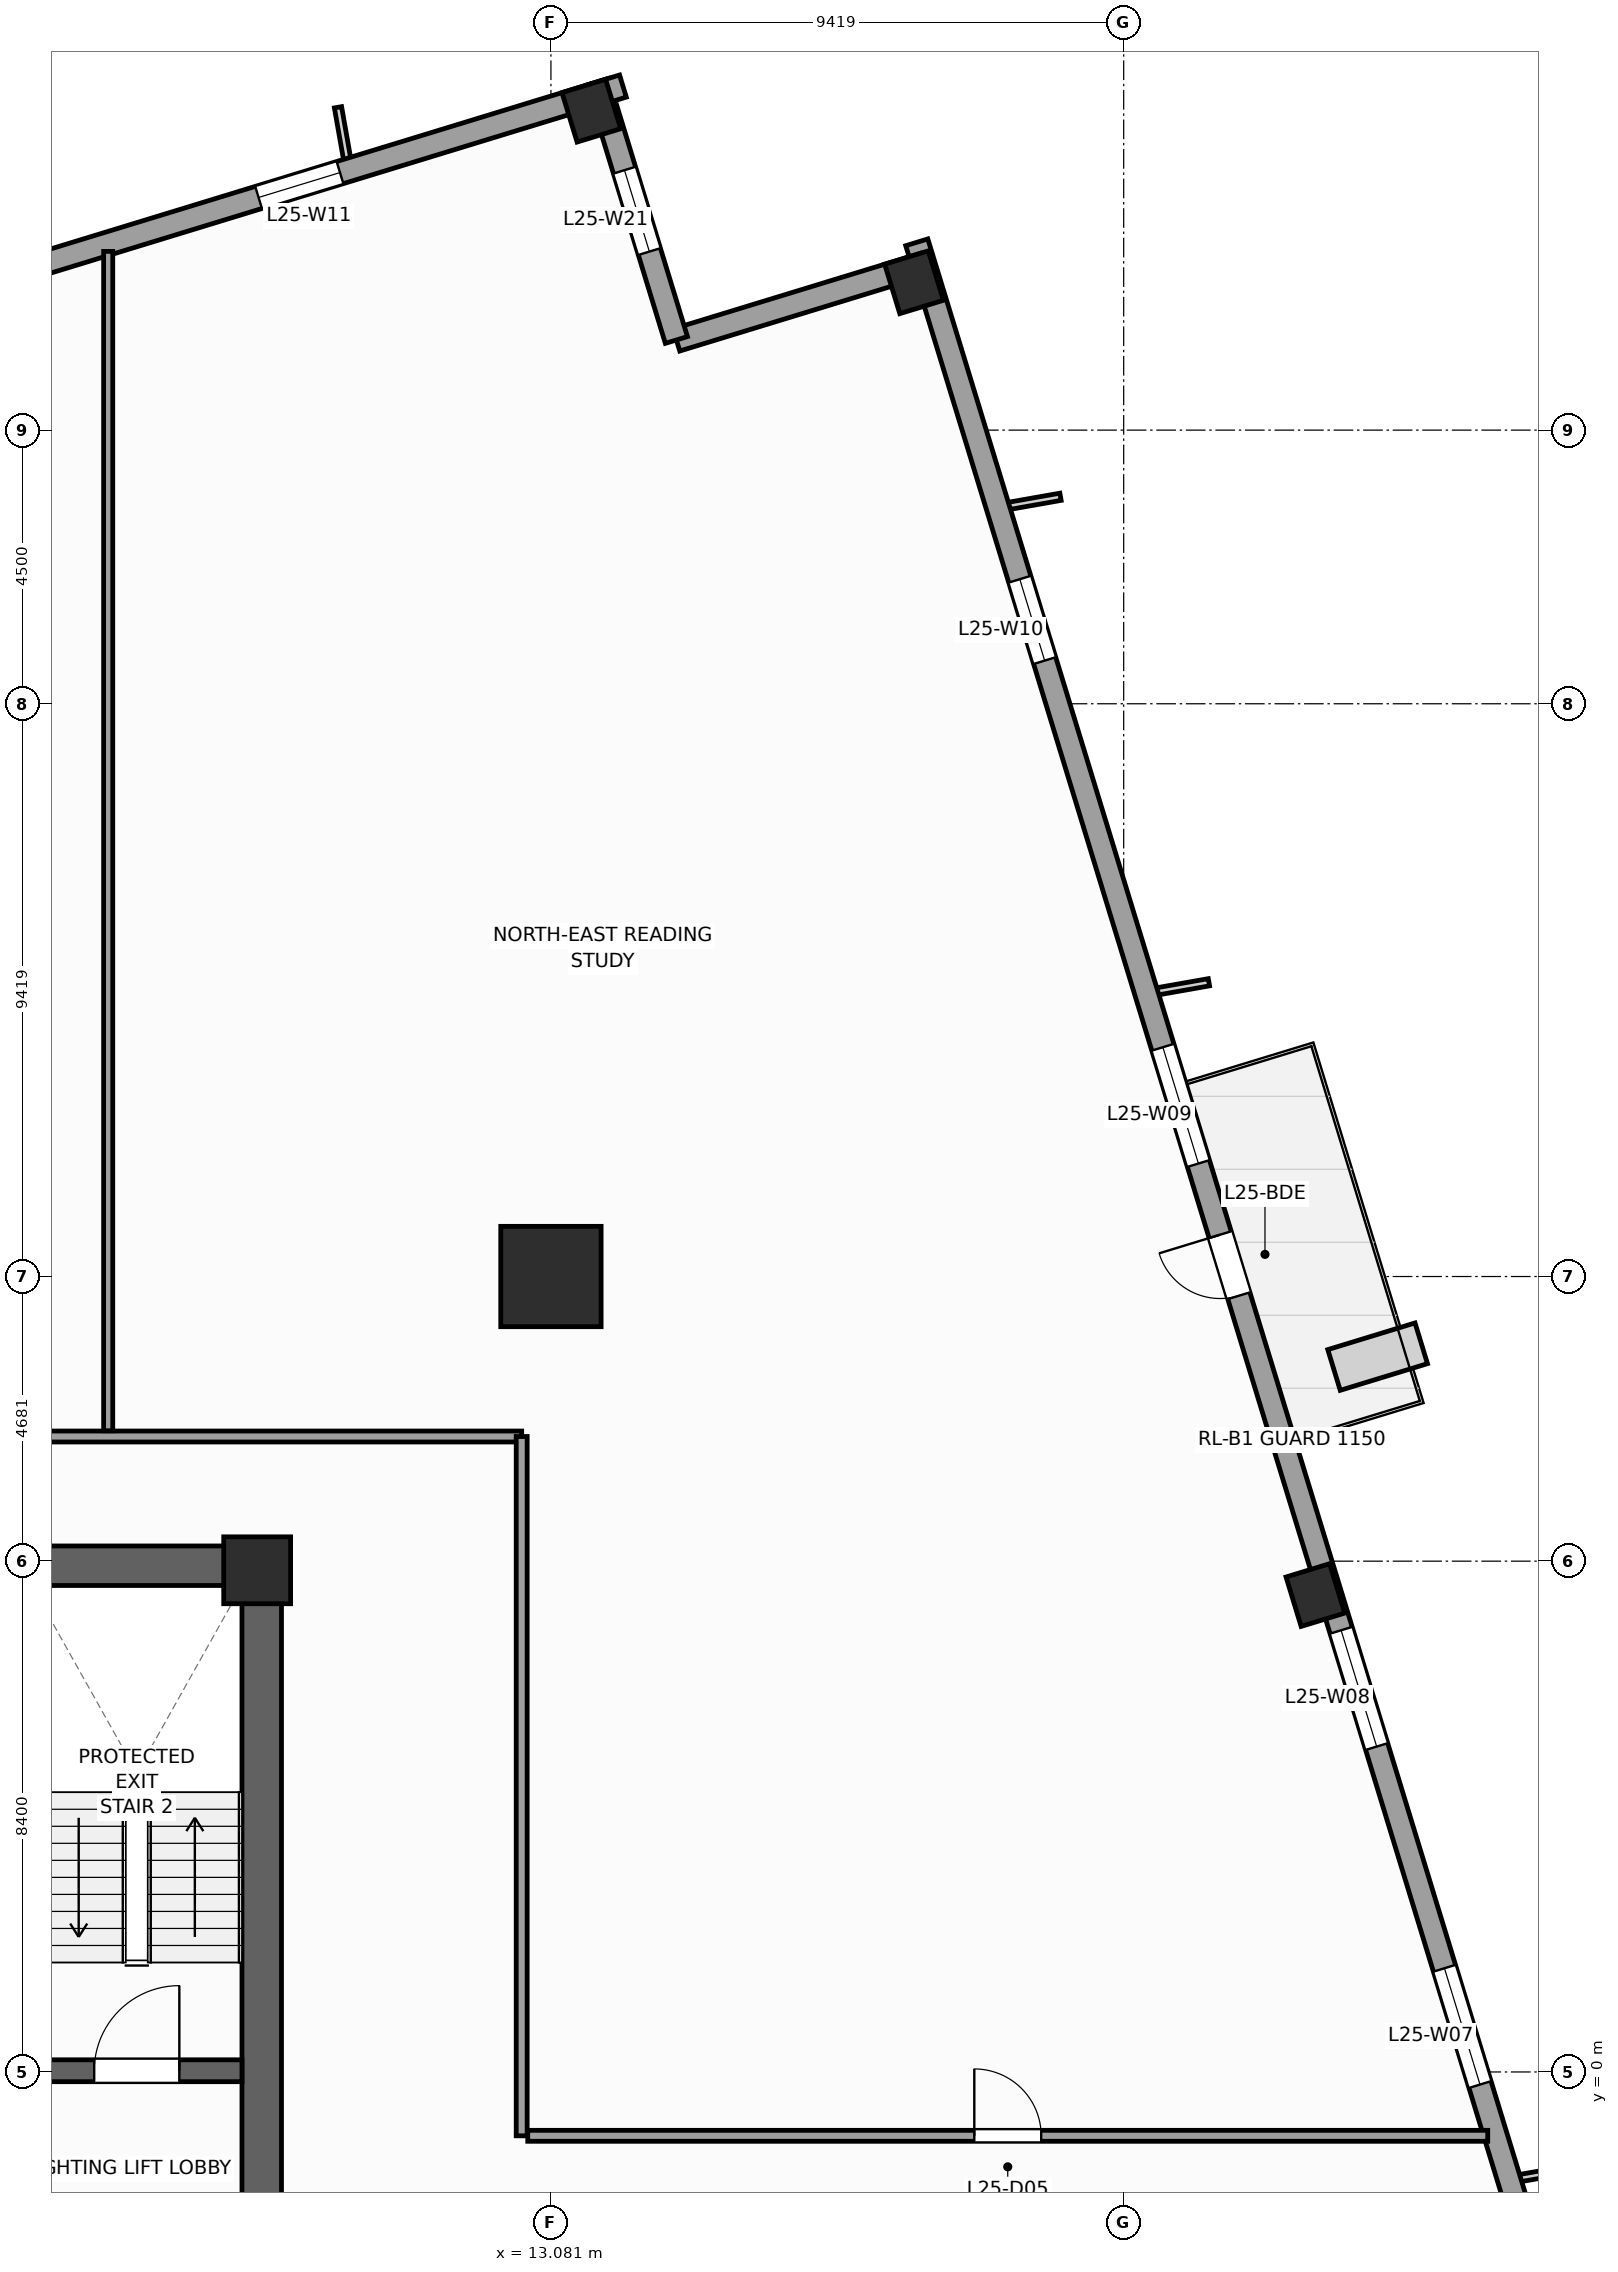
"""IFC4 building model, lengths in metres.
Left out: names, types, materials, properties, quantities, classifications, styles, units other than length and angle.
Written with IfcOpenShell. Run it as: python <this file> out.ifc"""

import sys

from ifc_helpers import new_model, si_unit, direction, frame, frame_2d, origin, origin_2d, place, context, subcontext, project, spatial, rectangle, extrude, source, transform, mapped, element, fill, save


model = new_model("IFC4")
c1 = context("Model", 3, precision=1e-05, world=origin(), true_north=direction((0.0, 1.0)))
c2 = subcontext(c1, "Body", "Model", "MODEL_VIEW")
j1 = project(units=[si_unit("LENGTHUNIT", "METRE"), si_unit("PLANEANGLEUNIT", "RADIAN")], contexts=[c1])
p1 = place(None, origin())
s1 = spatial("IfcSite", under=j1, at=p1, CompositionType="ELEMENT")
p2 = place(p1, origin())
s2 = spatial("IfcBuilding", under=s1, at=p2, CompositionType="ELEMENT")
p3 = place(p2, frame((0.0, 0.0, 107.2)))
s3 = spatial("IfcBuildingStorey", under=s2, at=p3, CompositionType="ELEMENT", Elevation=107.2)
p4 = place(p3, frame((-8.65, 8.325, 0.0), z_axis=(0.0, 0.0, 1.0), x_axis=(1.0, 0.0, 0.0)))
e1 = element("IfcWall", 1, at=p4, inside=s3, PredefinedType="SHEAR", context=c2, shape_type="SweptSolid", body=[
    extrude(rectangle(XDim=17.3, YDim=0.65, at=frame_2d((8.65, 0.0))), origin(), (0.0, 0.0, 1.0), 4.0),
])
p5 = place(p3, frame((8.325, -8.0, 0.0), z_axis=(0.0, 0.0, 1.0), x_axis=(0.0, 1.0, 0.0)))
e2 = element("IfcWall", 2, at=p5, inside=s3, PredefinedType="SHEAR", context=c2, shape_type="SweptSolid", body=[
    extrude(rectangle(XDim=16.0, YDim=0.65, at=frame_2d((8.0, 0.0))), origin(), (0.0, 0.0, 1.0), 4.0),
])
p6 = place(p5, frame((4.69, 0.0, 0.0)))
e3 = element("IfcOpeningElement", 3, at=p6, cuts=e2, PredefinedType="OPENING", context=c2, shape_type="SweptSolid", body=[
    extrude(rectangle(XDim=1.3, YDim=2.2, at=frame_2d((0.65, 1.1))), frame((0.0, 0.335, 0.0), z_axis=(0.0, -1.0, 0.0), x_axis=(1.0, 0.0, 0.0)), (0.0, 0.0, 1.0), 0.67),
])
p7 = place(p3, frame((4.54, 0.02, 0.0), z_axis=(0.0, 0.0, 1.0), x_axis=(1.0, 0.0, 0.0)))
e4 = element("IfcWall", 4, at=p7, inside=s3, PredefinedType="SHEAR", context=c2, shape_type="SweptSolid", body=[
    extrude(rectangle(XDim=3.46, YDim=0.36, at=frame_2d((1.73, 0.0))), origin(), (0.0, 0.0, 1.0), 4.0),
])
p8 = place(p7, frame((1.03, 0.0, 0.0)))
e5 = element("IfcOpeningElement", 5, at=p8, cuts=e4, PredefinedType="OPENING", context=c2, shape_type="SweptSolid", body=[
    extrude(rectangle(XDim=1.4, YDim=2.2, at=frame_2d((0.7, 1.1))), frame((0.0, 0.19, 0.0), z_axis=(0.0, -1.0, 0.0), x_axis=(1.0, 0.0, 0.0)), (0.0, 0.0, 1.0), 0.38),
])
m1 = source(origin(), c2, "Body", "SweptSolid", [
    extrude(rectangle(XDim=1.1, YDim=1.1, at=origin_2d()), origin(), (0.0, 0.0, 1.0), 4.0),
])
p9 = place(p3, frame((8.25, 8.25, 0.0), z_axis=(0.0, 0.0, 1.0), x_axis=(1.0, 0.0, 0.0)))
e6 = element("IfcColumn", 6, at=p9, inside=s3, PredefinedType="PILASTER", context=c2, shape_type="MappedRepresentation", body=[
    mapped(m1, transform((0.0, 0.0, 0.0), scale=1.0)),
])
m2 = source(origin(), c2, "Body", "SweptSolid", [
    extrude(rectangle(XDim=1.65, YDim=1.65, at=origin_2d()), origin(), (0.0, 0.0, 1.0), 4.0),
])
p10 = place(p3, frame((13.081, 13.081, 0.0), z_axis=(0.0, 0.0, 1.0), x_axis=(1.0, 0.0, 0.0)))
e7 = element("IfcColumn", 7, at=p10, inside=s3, PredefinedType="COLUMN", context=c2, shape_type="MappedRepresentation", body=[
    mapped(m2, transform((0.0, 0.0, 0.0), scale=1.0)),
])
m3 = source(origin(), c2, "Body", "SweptSolid", [
    extrude(rectangle(XDim=0.75, YDim=0.85, at=origin_2d()), origin(), (0.0, 0.0, 1.0), 4.0),
])
for number, where, z_axis, x_axis in (
    (8, (25.653, 7.843, 0.0), (0.0, 0.0, 1.0), (0.956, 0.292, 0.0)),
    (9, (19.052, 29.431, 0.0), (0.0, 0.0, 1.0), (0.956, 0.292, 0.0)),
    (10, (13.746, 32.253, 0.0), (0.0, 0.0, 1.0), (0.956, 0.292, 0.0)),
):
    element("IfcColumn", number, at=place(p3, frame(where, z_axis=z_axis, x_axis=x_axis)), inside=s3, PredefinedType="COLUMN", context=c2, shape_type="MappedRepresentation", body=[
        mapped(m3, transform((0.0, 0.0, 0.0), scale=1.0)),
    ])
p11 = place(p3, frame((32.658, -14.265, 0.0), z_axis=(0.0, 0.0, 1.0), x_axis=(-0.292373127906, 0.956304320851, 0.0)))
e11 = element("IfcWall", 11, at=p11, inside=s3, PredefinedType="STANDARD", context=c2, shape_type="SweptSolid", body=[
    extrude(rectangle(XDim=46.38, YDim=0.38, at=frame_2d((23.19, 0.0))), origin(), (0.0, 0.0, 1.0), 3.14),
])
p12 = place(p11, frame((28.265, 0.0, 0.0)))
e12 = element("IfcOpeningElement", 12, at=p12, cuts=e11, PredefinedType="OPENING", context=c2, shape_type="SweptSolid", body=[
    extrude(rectangle(XDim=1.05, YDim=2.25, at=frame_2d((0.525, 1.125))), frame((0.0, 0.2, 0.0), z_axis=(0.0, -1.0, 0.0), x_axis=(1.0, 0.0, 0.0)), (0.0, 0.0, 1.0), 0.4),
])
p13 = place(p11, frame((4.865, 0.0, 0.51)))
e13 = element("IfcOpeningElement", 13, at=p13, cuts=e11, PredefinedType="OPENING", context=c2, shape_type="SweptSolid", body=[
    extrude(rectangle(XDim=1.4, YDim=2.4, at=frame_2d((0.7, 1.2))), frame((0.0, 0.2, 0.0), z_axis=(0.0, -1.0, 0.0), x_axis=(1.0, 0.0, 0.0)), (0.0, 0.0, 1.0), 0.4),
])
p14 = place(p11, frame((14.7, 0.0, 0.51)))
e14 = element("IfcOpeningElement", 14, at=p14, cuts=e11, PredefinedType="OPENING", context=c2, shape_type="SweptSolid", body=[
    extrude(rectangle(XDim=2.0, YDim=2.4, at=frame_2d((1.0, 1.2))), frame((0.0, 0.2, 0.0), z_axis=(0.0, -1.0, 0.0), x_axis=(1.0, 0.0, 0.0)), (0.0, 0.0, 1.0), 0.4),
])
p15 = place(p11, frame((20.512, 0.0, 0.51)))
e15 = element("IfcOpeningElement", 15, at=p15, cuts=e11, PredefinedType="OPENING", context=c2, shape_type="SweptSolid", body=[
    extrude(rectangle(XDim=2.0, YDim=2.4, at=frame_2d((1.0, 1.2))), frame((0.0, 0.2, 0.0), z_axis=(0.0, -1.0, 0.0), x_axis=(1.0, 0.0, 0.0)), (0.0, 0.0, 1.0), 0.4),
])
p16 = place(p11, frame((30.538, 0.0, 0.51)))
e16 = element("IfcOpeningElement", 16, at=p16, cuts=e11, PredefinedType="OPENING", context=c2, shape_type="SweptSolid", body=[
    extrude(rectangle(XDim=2.0, YDim=2.4, at=frame_2d((1.0, 1.2))), frame((0.0, 0.2, 0.0), z_axis=(0.0, -1.0, 0.0), x_axis=(1.0, 0.0, 0.0)), (0.0, 0.0, 1.0), 0.4),
])
p17 = place(p11, frame((39.187, 0.0, 0.51)))
e17 = element("IfcOpeningElement", 17, at=p17, cuts=e11, PredefinedType="OPENING", context=c2, shape_type="SweptSolid", body=[
    extrude(rectangle(XDim=1.4, YDim=2.4, at=frame_2d((0.7, 1.2))), frame((0.0, 0.2, 0.0), z_axis=(0.0, -1.0, 0.0), x_axis=(1.0, 0.0, 0.0)), (0.0, 0.0, 1.0), 0.4),
])
p18 = place(p3, frame((19.208, 29.725, 0.0), z_axis=(0.0, 0.0, 1.0), x_axis=(-0.956312764915, -0.292345507338, 0.0)))
e18 = element("IfcWall", 18, at=p18, inside=s3, PredefinedType="STANDARD", context=c2, shape_type="SweptSolid", body=[
    extrude(rectangle(XDim=4.25, YDim=0.38, at=frame_2d((2.125, 0.0))), origin(), (0.0, 0.0, 1.0), 3.74),
])
p19 = place(p3, frame((15.144, 28.482, 0.0), z_axis=(0.0, 0.0, 1.0), x_axis=(-0.292373601522, 0.956304176051, 0.0)))
e19 = element("IfcWall", 19, at=p19, inside=s3, PredefinedType="STANDARD", context=c2, shape_type="SweptSolid", body=[
    extrude(rectangle(XDim=4.44, YDim=0.38, at=frame_2d((2.22, 0.0))), origin(), (0.0, 0.0, 1.0), 3.04),
])
p20 = place(p19, frame((1.52, 0.0, 0.51)))
e20 = element("IfcOpeningElement", 20, at=p20, cuts=e19, PredefinedType="OPENING", context=c2, shape_type="SweptSolid", body=[
    extrude(rectangle(XDim=1.4, YDim=2.4, at=frame_2d((0.7, 1.2))), frame((0.0, 0.2, 0.0), z_axis=(0.0, -1.0, 0.0), x_axis=(1.0, 0.0, 0.0)), (0.0, 0.0, 1.0), 0.4),
])
p21 = place(p3, frame((14.265, 32.658, 0.0), z_axis=(0.0, 0.0, 1.0), x_axis=(-0.956304320851, -0.292373127906, 0.0)))
e21 = element("IfcWall", 21, at=p21, inside=s3, PredefinedType="STANDARD", context=c2, shape_type="SweptSolid", body=[
    extrude(rectangle(XDim=46.38, YDim=0.38, at=frame_2d((23.19, 0.0))), origin(), (0.0, 0.0, 1.0), 3.14),
])
p22 = place(p21, frame((4.865, 0.0, 0.51)))
e22 = element("IfcOpeningElement", 22, at=p22, cuts=e21, PredefinedType="OPENING", context=c2, shape_type="SweptSolid", body=[
    extrude(rectangle(XDim=1.4, YDim=2.4, at=frame_2d((0.7, 1.2))), frame((0.0, 0.2, 0.0), z_axis=(0.0, -1.0, 0.0), x_axis=(1.0, 0.0, 0.0)), (0.0, 0.0, 1.0), 0.4),
])
p23 = place(p21, frame((12.45, 0.0, 0.51)))
e23 = element("IfcOpeningElement", 23, at=p23, cuts=e21, PredefinedType="OPENING", context=c2, shape_type="SweptSolid", body=[
    extrude(rectangle(XDim=2.0, YDim=2.4, at=frame_2d((1.0, 1.2))), frame((0.0, 0.2, 0.0), z_axis=(0.0, -1.0, 0.0), x_axis=(1.0, 0.0, 0.0)), (0.0, 0.0, 1.0), 0.4),
])
p24 = place(p21, frame((30.538, 0.0, 0.51)))
e24 = element("IfcOpeningElement", 24, at=p24, cuts=e21, PredefinedType="OPENING", context=c2, shape_type="SweptSolid", body=[
    extrude(rectangle(XDim=2.0, YDim=2.4, at=frame_2d((1.0, 1.2))), frame((0.0, 0.2, 0.0), z_axis=(0.0, -1.0, 0.0), x_axis=(1.0, 0.0, 0.0)), (0.0, 0.0, 1.0), 0.4),
])
p25 = place(p21, frame((39.187, 0.0, 0.51)))
e25 = element("IfcOpeningElement", 25, at=p25, cuts=e21, PredefinedType="OPENING", context=c2, shape_type="SweptSolid", body=[
    extrude(rectangle(XDim=1.4, YDim=2.4, at=frame_2d((0.7, 1.2))), frame((0.0, 0.2, 0.0), z_axis=(0.0, -1.0, 0.0), x_axis=(1.0, 0.0, 0.0)), (0.0, 0.0, 1.0), 0.4),
])
p26 = place(p3, frame((-12.6, 10.45, 0.0), z_axis=(0.0, 0.0, 1.0), x_axis=(1.0, 0.0, 0.0)))
e26 = element("IfcWall", 26, at=p26, inside=s3, PredefinedType="PARTITIONING", context=c2, shape_type="SweptSolid", body=[
    extrude(rectangle(XDim=25.2, YDim=0.18, at=frame_2d((12.6, 0.0))), origin(), (0.0, 0.0, 1.0), 3.74),
])
p27 = place(p26, frame((5.014, 0.0, 0.0)))
e27 = element("IfcOpeningElement", 27, at=p27, cuts=e26, PredefinedType="OPENING", context=c2, shape_type="SweptSolid", body=[
    extrude(rectangle(XDim=0.95, YDim=2.1, at=frame_2d((0.475, 1.05))), frame((0.0, 0.1, 0.0), z_axis=(0.0, -1.0, 0.0), x_axis=(1.0, 0.0, 0.0)), (0.0, 0.0, 1.0), 0.2),
])
p28 = place(p26, frame((2.59, 0.0, 0.0)))
e28 = element("IfcOpeningElement", 28, at=p28, cuts=e26, PredefinedType="OPENING", context=c2, shape_type="SweptSolid", body=[
    extrude(rectangle(XDim=0.95, YDim=2.1, at=frame_2d((0.475, 1.05))), frame((0.0, 0.1, 0.0), z_axis=(0.0, -1.0, 0.0), x_axis=(1.0, 0.0, 0.0)), (0.0, 0.0, 1.0), 0.2),
])
p29 = place(p26, frame((12.05, 0.0, 0.0)))
e29 = element("IfcOpeningElement", 29, at=p29, cuts=e26, PredefinedType="OPENING", context=c2, shape_type="SweptSolid", body=[
    extrude(rectangle(XDim=1.1, YDim=2.2, at=frame_2d((0.55, 1.1))), frame((0.0, 0.1, 0.0), z_axis=(0.0, -1.0, 0.0), x_axis=(1.0, 0.0, 0.0)), (0.0, 0.0, 1.0), 0.2),
])
p30 = place(p3, frame((12.6, -1.05, 0.0), z_axis=(0.0, 0.0, 1.0), x_axis=(0.0, 1.0, 0.0)))
e30 = element("IfcWall", 30, at=p30, inside=s3, PredefinedType="PARTITIONING", context=c2, shape_type="SweptSolid", body=[
    extrude(rectangle(XDim=11.5, YDim=0.18, at=frame_2d((5.75, 0.0))), origin(), (0.0, 0.0, 1.0), 3.74),
])
p31 = place(p3, frame((12.7, -1.05, 0.0), z_axis=(0.0, 0.0, 1.0), x_axis=(1.0, 0.0, 0.0)))
e31 = element("IfcWall", 31, at=p31, inside=s3, PredefinedType="PARTITIONING", context=c2, shape_type="SweptSolid", body=[
    extrude(rectangle(XDim=15.787, YDim=0.18, at=frame_2d((7.894, 0.0))), origin(), (0.0, 0.0, 1.0), 3.74),
])
p32 = place(p31, frame((7.343, 0.0, 0.0)))
e32 = element("IfcOpeningElement", 32, at=p32, cuts=e31, PredefinedType="OPENING", context=c2, shape_type="SweptSolid", body=[
    extrude(rectangle(XDim=1.1, YDim=2.2, at=frame_2d((0.55, 1.1))), frame((0.0, 0.1, 0.0), z_axis=(0.0, -1.0, 0.0), x_axis=(1.0, 0.0, 0.0)), (0.0, 0.0, 1.0), 0.2),
])
p33 = place(p3, frame((5.8, 10.545, 0.0), z_axis=(0.0, 0.0, 1.0), x_axis=(0.0, 1.0, 0.0)))
e33 = element("IfcWall", 33, at=p33, inside=s3, PredefinedType="PARTITIONING", context=c2, shape_type="SweptSolid", body=[
    extrude(rectangle(XDim=19.394, YDim=0.15, at=frame_2d((9.697, 0.0))), origin(), (0.0, 0.0, 1.0), 3.74),
])
m4 = source(origin(), c2, "Body", "SweptSolid", [
    extrude(rectangle(XDim=1.05, YDim=2.25, at=frame_2d((0.525, 1.125))), frame((0.0, 0.025, 0.0), z_axis=(0.0, -1.0, 0.0), x_axis=(1.0, 0.0, 0.0)), (0.0, 0.0, 1.0), 0.05),
])
p34 = place(p12, origin())
e34 = element("IfcDoor", 34, at=p34, inside=s3, OperationType="SINGLE_SWING_RIGHT", PredefinedType="DOOR", context=c2, shape_type="MappedRepresentation", body=[
    mapped(m4, transform((0.0, 0.0, 0.0), scale=1.0)),
])
fill(e12, e34)
m5 = source(origin(), c2, "Body", "SweptSolid", [
    extrude(rectangle(XDim=2.0, YDim=2.4, at=frame_2d((1.0, 1.2))), frame((0.0, 0.03, 0.0), z_axis=(0.0, -1.0, 0.0), x_axis=(1.0, 0.0, 0.0)), (0.0, 0.0, 1.0), 0.06),
])
p35 = place(p14, origin())
e35 = element("IfcWindow", 35, at=p35, inside=s3, PartitioningType="SINGLE_PANEL", PredefinedType="WINDOW", context=c2, shape_type="MappedRepresentation", body=[
    mapped(m5, transform((0.0, 0.0, 0.0), scale=1.0)),
])
fill(e14, e35)
p36 = place(p15, origin())
e36 = element("IfcWindow", 36, at=p36, inside=s3, PartitioningType="SINGLE_PANEL", PredefinedType="WINDOW", context=c2, shape_type="MappedRepresentation", body=[
    mapped(m5, transform((0.0, 0.0, 0.0), scale=1.0)),
])
fill(e15, e36)
p37 = place(p16, origin())
e37 = element("IfcWindow", 37, at=p37, inside=s3, PartitioningType="SINGLE_PANEL", PredefinedType="WINDOW", context=c2, shape_type="MappedRepresentation", body=[
    mapped(m5, transform((0.0, 0.0, 0.0), scale=1.0)),
])
fill(e16, e37)
m6 = source(origin(), c2, "Body", "SweptSolid", [
    extrude(rectangle(XDim=1.4, YDim=2.4, at=frame_2d((0.7, 1.2))), frame((0.0, 0.03, 0.0), z_axis=(0.0, -1.0, 0.0), x_axis=(1.0, 0.0, 0.0)), (0.0, 0.0, 1.0), 0.06),
])
p38 = place(p17, origin())
e38 = element("IfcWindow", 38, at=p38, inside=s3, PartitioningType="SINGLE_PANEL", PredefinedType="WINDOW", context=c2, shape_type="MappedRepresentation", body=[
    mapped(m6, transform((0.0, 0.0, 0.0), scale=1.0)),
])
fill(e17, e38)
p39 = place(p22, origin())
e39 = element("IfcWindow", 39, at=p39, inside=s3, PartitioningType="SINGLE_PANEL", PredefinedType="WINDOW", context=c2, shape_type="MappedRepresentation", body=[
    mapped(m6, transform((0.0, 0.0, 0.0), scale=1.0)),
])
fill(e22, e39)
p40 = place(p20, origin())
e40 = element("IfcWindow", 40, at=p40, inside=s3, PartitioningType="SINGLE_PANEL", PredefinedType="WINDOW", context=c2, shape_type="MappedRepresentation", body=[
    mapped(m6, transform((0.0, 0.0, 0.0), scale=1.0)),
])
fill(e20, e40)
m7 = source(origin(), c2, "Body", "SweptSolid", [
    extrude(rectangle(XDim=1.4, YDim=2.2, at=frame_2d((0.7, 1.1))), frame((0.0, 0.025, 0.0), z_axis=(0.0, -1.0, 0.0), x_axis=(1.0, 0.0, 0.0)), (0.0, 0.0, 1.0), 0.05),
])
p41 = place(p8, origin())
e41 = element("IfcDoor", 41, at=p41, inside=s3, OperationType="SINGLE_SWING_RIGHT", PredefinedType="DOOR", context=c2, shape_type="MappedRepresentation", body=[
    mapped(m7, transform((0.0, 0.0, 0.0), scale=1.0)),
])
fill(e5, e41)
m8 = source(origin(), c2, "Body", "SweptSolid", [
    extrude(rectangle(XDim=1.1, YDim=2.2, at=frame_2d((0.55, 1.1))), frame((0.0, 0.025, 0.0), z_axis=(0.0, -1.0, 0.0), x_axis=(1.0, 0.0, 0.0)), (0.0, 0.0, 1.0), 0.05),
])
p42 = place(p32, origin())
e42 = element("IfcDoor", 42, at=p42, inside=s3, OperationType="SINGLE_SWING_LEFT", PredefinedType="DOOR", context=c2, shape_type="MappedRepresentation", body=[
    mapped(m8, transform((0.0, 0.0, 0.0), scale=1.0)),
])
fill(e32, e42)
save(model, sys.argv[1])
